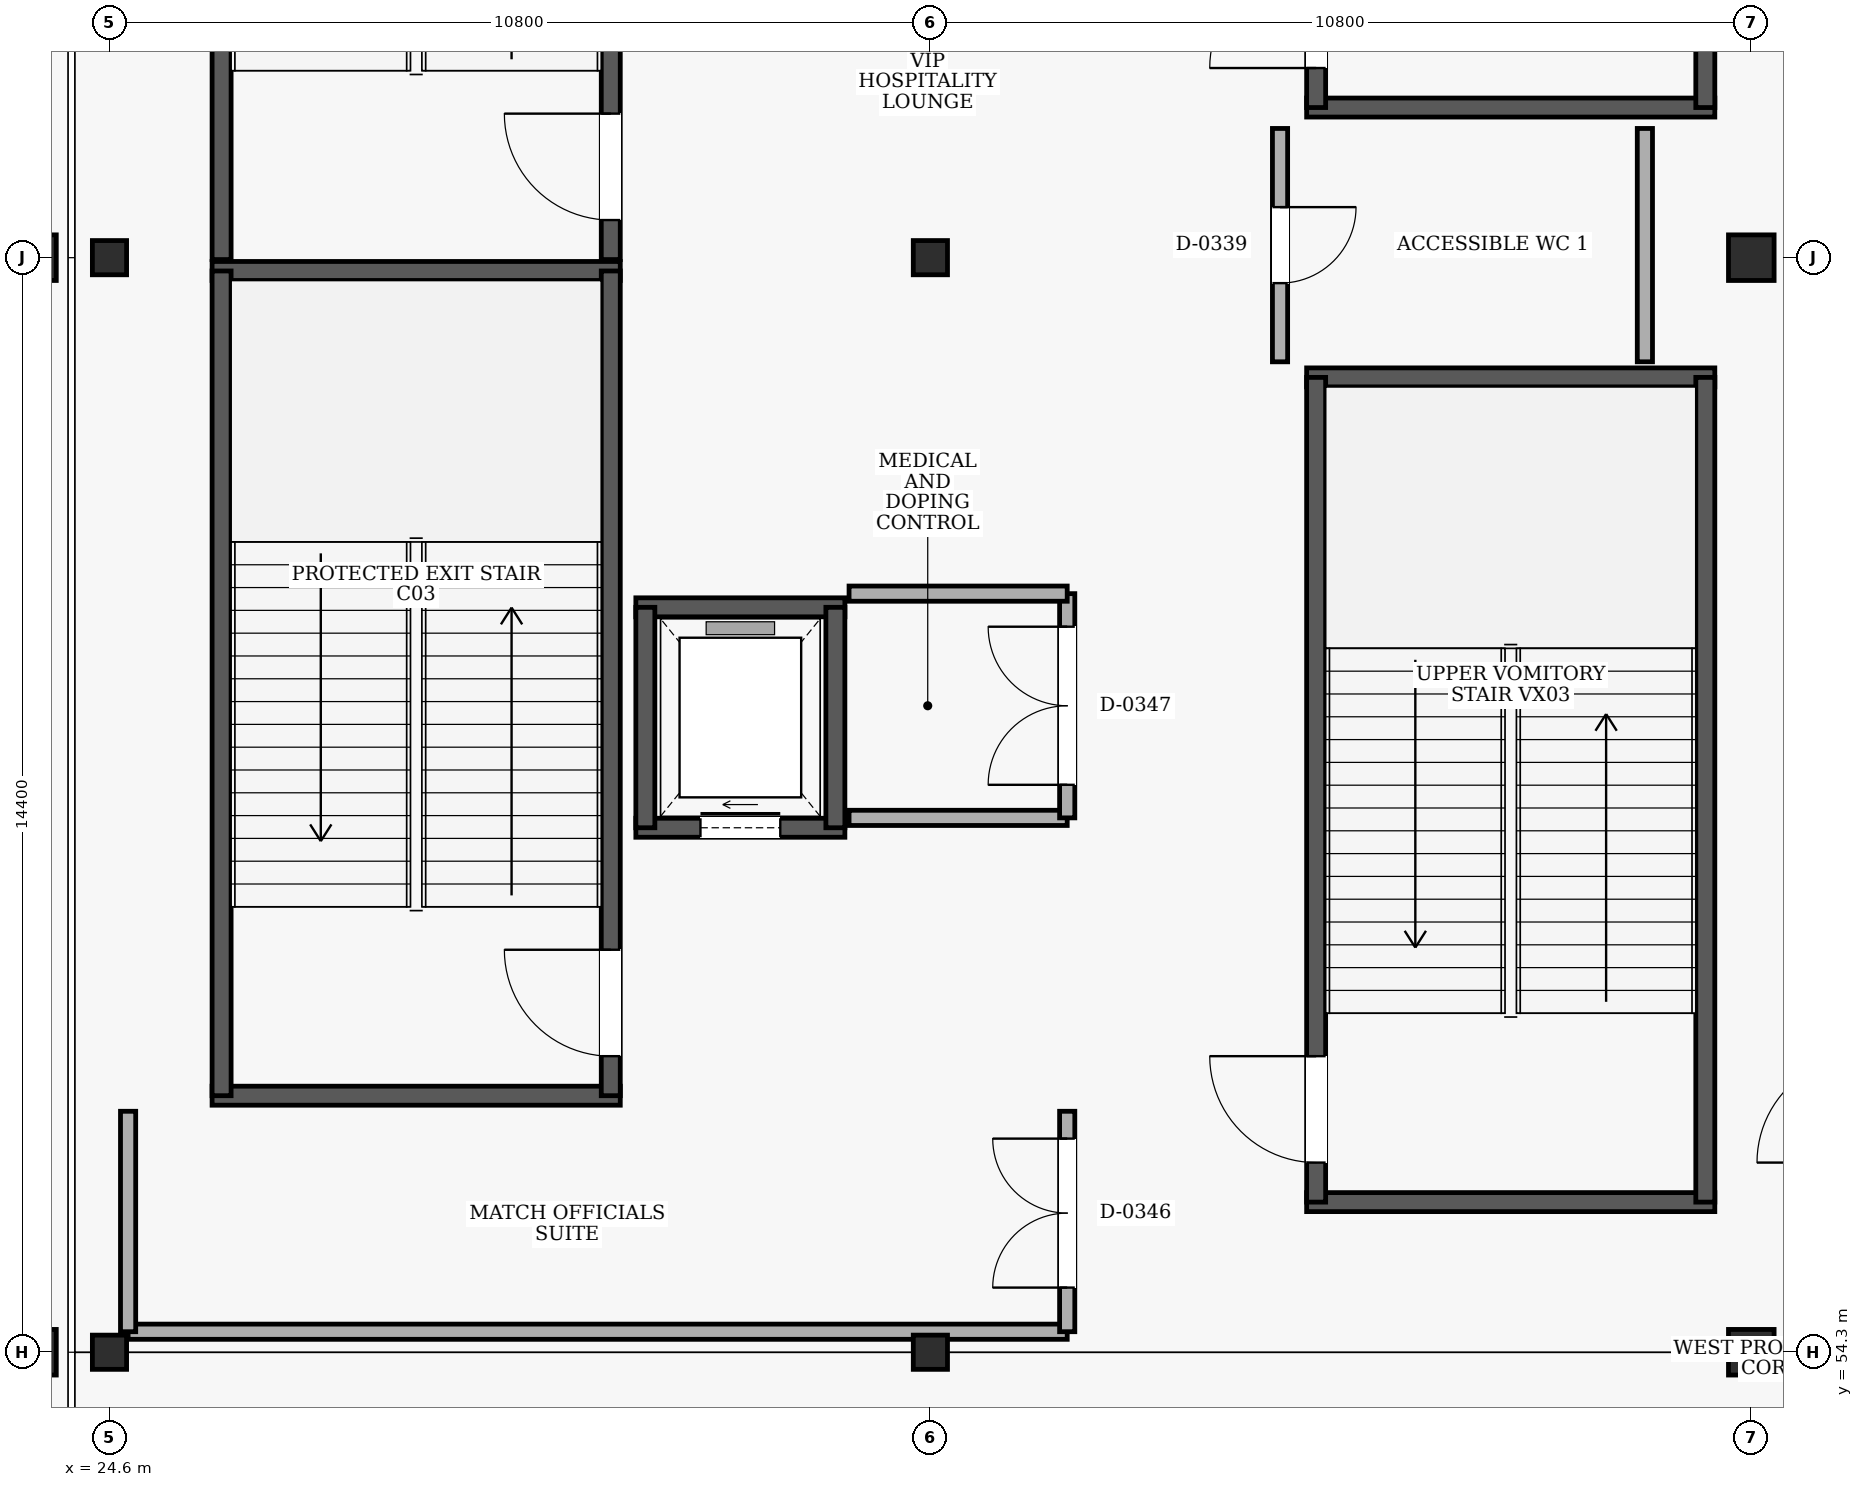
"""IFC4 building model, lengths in metres.
Left out: names, types, materials, properties, quantities, classifications, styles, units other than length and angle.
Written with IfcOpenShell. Run it as: python <this file> out.ifc"""

import sys

from ifc_helpers import new_model, si_unit, direction, frame, frame_2d, origin, origin_2d, place, context, subcontext, project, spatial, rectangle, extrude, element, fill, save


model = new_model("IFC4")
c1 = context("Model", 3, precision=1e-05, world=origin(), true_north=direction((0.0, 1.0)))
c2 = subcontext(c1, "Body", "Model", "MODEL_VIEW")
j1 = project(units=[si_unit("LENGTHUNIT", "METRE"), si_unit("PLANEANGLEUNIT", "RADIAN")], contexts=[c1])
p1 = place(None, origin())
s1 = spatial("IfcSite", under=j1, at=p1, CompositionType="ELEMENT")
p2 = place(p1, origin())
s2 = spatial("IfcBuilding", under=s1, at=p2, CompositionType="ELEMENT")
p3 = place(p2, origin())
s3 = spatial("IfcBuildingStorey", under=s2, at=p3, CompositionType="ELEMENT", Elevation=0.0)
for number, where, z_axis, x_axis in (
    (1, (23.6, 54.3, 0.0), (0.0, 0.0, 1.0), (1.0, 0.0, 0.0)),
    (2, (23.6, 68.7, 0.0), (0.0, 0.0, 1.0), (1.0, 0.0, 0.0)),
):
    element("IfcColumn", number, at=place(p3, frame(where, z_axis=z_axis, x_axis=x_axis)), inside=s3, PredefinedType="COLUMN", context=c2, shape_type="SweptSolid", body=[
        extrude(rectangle(XDim=0.6, YDim=0.6, at=origin_2d()), origin(), (0.0, 0.0, 1.0), 5.4),
    ])
for number, where, z_axis, x_axis in (
    (3, (24.6, 54.3, 0.0), (0.0, 0.0, 1.0), (1.0, 0.0, 0.0)),
    (4, (24.6, 68.7, 0.0), (0.0, 0.0, 1.0), (1.0, 0.0, 0.0)),
    (5, (35.4, 54.3, 0.0), (0.0, 0.0, 1.0), (1.0, 0.0, 0.0)),
    (6, (35.4, 68.7, 0.0), (0.0, 0.0, 1.0), (1.0, 0.0, 0.0)),
):
    element("IfcColumn", number, at=place(p3, frame(where, z_axis=z_axis, x_axis=x_axis)), inside=s3, PredefinedType="COLUMN", context=c2, shape_type="SweptSolid", body=[
        extrude(rectangle(XDim=0.45, YDim=0.45, at=origin_2d()), origin(), (0.0, 0.0, 1.0), 5.4),
    ])
for number, where, z_axis, x_axis in (
    (7, (46.2, 54.3, 0.0), (0.0, 0.0, 1.0), (1.0, 0.0, 0.0)),
    (8, (46.2, 68.7, 0.0), (0.0, 0.0, 1.0), (1.0, 0.0, 0.0)),
):
    element("IfcColumn", number, at=place(p3, frame(where, z_axis=z_axis, x_axis=x_axis)), inside=s3, PredefinedType="COLUMN", context=c2, shape_type="SweptSolid", body=[
        extrude(rectangle(XDim=0.6, YDim=0.6, at=origin_2d()), origin(), (0.0, 0.0, 1.0), 5.4),
    ])
for number, where, z_axis, x_axis in (
    (9, (25.95, 57.675, 0.0), (0.0, 0.0, 1.0), (1.0, 0.0, 0.0)),
    (10, (31.32, 68.525, 0.0), (0.0, 0.0, 1.0), (-1.0, 0.0, 0.0)),
):
    element("IfcWall", number, at=place(p3, frame(where, z_axis=z_axis, x_axis=x_axis)), inside=s3, PredefinedType="SHEAR", context=c2, shape_type="SweptSolid", body=[
        extrude(rectangle(XDim=5.37, YDim=0.25, at=frame_2d((2.685, 0.0))), origin(), (0.0, 0.0, 1.0), 5.08),
    ])
p4 = place(p3, frame((26.075, 57.675, 0.0), z_axis=(0.0, 0.0, 1.0), x_axis=(0.0, 1.0, 0.0)))
e11 = element("IfcWall", 11, at=p4, inside=s3, PredefinedType="SHEAR", context=c2, shape_type="SweptSolid", body=[
    extrude(rectangle(XDim=10.85, YDim=0.25, at=frame_2d((5.425, 0.0))), origin(), (0.0, 0.0, 1.0), 5.08),
])
p5 = place(p3, frame((31.195, 57.675, 0.0), z_axis=(0.0, 0.0, 1.0), x_axis=(0.0, 1.0, 0.0)))
e12 = element("IfcWall", 12, at=p5, inside=s3, PredefinedType="SHEAR", context=c2, shape_type="SweptSolid", body=[
    extrude(rectangle(XDim=10.85, YDim=0.25, at=frame_2d((5.425, 0.0))), origin(), (0.0, 0.0, 1.0), 5.08),
])
p6 = place(p5, frame((0.52, 0.0, 0.0)))
e13 = element("IfcOpeningElement", 13, at=p6, cuts=e12, PredefinedType="OPENING", context=c2, shape_type="SweptSolid", body=[
    extrude(rectangle(XDim=1.4, YDim=2.15, at=frame_2d((0.7, 1.075))), frame((0.0, 0.135, 0.0), z_axis=(0.0, -1.0, 0.0), x_axis=(1.0, 0.0, 0.0)), (0.0, 0.0, 1.0), 0.27),
])
p7 = place(p3, frame((26.075, 68.675, 0.0), z_axis=(0.0, 0.0, 1.0), x_axis=(0.0, 1.0, 0.0)))
e14 = element("IfcWall", 14, at=p7, inside=s3, PredefinedType="SHEAR", context=c2, shape_type="SweptSolid", body=[
    extrude(rectangle(XDim=10.85, YDim=0.25, at=frame_2d((5.425, 0.0))), origin(), (0.0, 0.0, 1.0), 5.08),
])
p8 = place(p3, frame((31.195, 68.675, 0.0), z_axis=(0.0, 0.0, 1.0), x_axis=(0.0, 1.0, 0.0)))
e15 = element("IfcWall", 15, at=p8, inside=s3, PredefinedType="SHEAR", context=c2, shape_type="SweptSolid", body=[
    extrude(rectangle(XDim=10.85, YDim=0.25, at=frame_2d((5.425, 0.0))), origin(), (0.0, 0.0, 1.0), 5.08),
])
p9 = place(p8, frame((0.52, 0.0, 0.0)))
e16 = element("IfcOpeningElement", 16, at=p9, cuts=e15, PredefinedType="OPENING", context=c2, shape_type="SweptSolid", body=[
    extrude(rectangle(XDim=1.4, YDim=2.15, at=frame_2d((0.7, 1.075))), frame((0.0, 0.135, 0.0), z_axis=(0.0, -1.0, 0.0), x_axis=(1.0, 0.0, 0.0)), (0.0, 0.0, 1.0), 0.27),
])
for number, where, z_axis, x_axis in (
    (17, (40.35, 56.275, 0.0), (0.0, 0.0, 1.0), (1.0, 0.0, 0.0)),
    (18, (45.72, 67.125, 0.0), (0.0, 0.0, 1.0), (-1.0, 0.0, 0.0)),
):
    element("IfcWall", number, at=place(p3, frame(where, z_axis=z_axis, x_axis=x_axis)), inside=s3, PredefinedType="SHEAR", context=c2, shape_type="SweptSolid", body=[
        extrude(rectangle(XDim=5.37, YDim=0.25, at=frame_2d((2.685, 0.0))), origin(), (0.0, 0.0, 1.0), 5.08),
    ])
p10 = place(p3, frame((40.475, 56.275, 0.0), z_axis=(0.0, 0.0, 1.0), x_axis=(0.0, 1.0, 0.0)))
e19 = element("IfcWall", 19, at=p10, inside=s3, PredefinedType="SHEAR", context=c2, shape_type="SweptSolid", body=[
    extrude(rectangle(XDim=10.85, YDim=0.25, at=frame_2d((5.425, 0.0))), origin(), (0.0, 0.0, 1.0), 5.08),
])
p11 = place(p10, frame((0.52, 0.0, 0.0)))
e20 = element("IfcOpeningElement", 20, at=p11, cuts=e19, PredefinedType="OPENING", context=c2, shape_type="SweptSolid", body=[
    extrude(rectangle(XDim=1.4, YDim=2.15, at=frame_2d((0.7, 1.075))), frame((0.0, 0.135, 0.0), z_axis=(0.0, -1.0, 0.0), x_axis=(1.0, 0.0, 0.0)), (0.0, 0.0, 1.0), 0.27),
])
p12 = place(p3, frame((45.595, 56.275, 0.0), z_axis=(0.0, 0.0, 1.0), x_axis=(0.0, 1.0, 0.0)))
e21 = element("IfcWall", 21, at=p12, inside=s3, PredefinedType="SHEAR", context=c2, shape_type="SweptSolid", body=[
    extrude(rectangle(XDim=10.85, YDim=0.25, at=frame_2d((5.425, 0.0))), origin(), (0.0, 0.0, 1.0), 5.08),
])
p13 = place(p3, frame((40.35, 70.675, 0.0), z_axis=(0.0, 0.0, 1.0), x_axis=(1.0, 0.0, 0.0)))
e22 = element("IfcWall", 22, at=p13, inside=s3, PredefinedType="SHEAR", context=c2, shape_type="SweptSolid", body=[
    extrude(rectangle(XDim=5.37, YDim=0.25, at=frame_2d((2.685, 0.0))), origin(), (0.0, 0.0, 1.0), 5.08),
])
p14 = place(p3, frame((40.475, 70.675, 0.0), z_axis=(0.0, 0.0, 1.0), x_axis=(0.0, 1.0, 0.0)))
e23 = element("IfcWall", 23, at=p14, inside=s3, PredefinedType="SHEAR", context=c2, shape_type="SweptSolid", body=[
    extrude(rectangle(XDim=10.85, YDim=0.25, at=frame_2d((5.425, 0.0))), origin(), (0.0, 0.0, 1.0), 5.08),
])
p15 = place(p14, frame((0.52, 0.0, 0.0)))
e24 = element("IfcOpeningElement", 24, at=p15, cuts=e23, PredefinedType="OPENING", context=c2, shape_type="SweptSolid", body=[
    extrude(rectangle(XDim=1.4, YDim=2.15, at=frame_2d((0.7, 1.075))), frame((0.0, 0.135, 0.0), z_axis=(0.0, -1.0, 0.0), x_axis=(1.0, 0.0, 0.0)), (0.0, 0.0, 1.0), 0.27),
])
p16 = place(p3, frame((45.595, 70.675, 0.0), z_axis=(0.0, 0.0, 1.0), x_axis=(0.0, 1.0, 0.0)))
e25 = element("IfcWall", 25, at=p16, inside=s3, PredefinedType="SHEAR", context=c2, shape_type="SweptSolid", body=[
    extrude(rectangle(XDim=10.85, YDim=0.25, at=frame_2d((5.425, 0.0))), origin(), (0.0, 0.0, 1.0), 5.08),
])
p17 = place(p3, frame((31.525, 61.2, 0.0), z_axis=(0.0, 0.0, 1.0), x_axis=(1.0, 0.0, 0.0)))
e26 = element("IfcWall", 26, at=p17, inside=s3, PredefinedType="SHEAR", context=c2, shape_type="SweptSolid", body=[
    extrude(rectangle(XDim=2.75, YDim=0.25, at=frame_2d((1.375, 0.0))), origin(), (0.0, 0.0, 1.0), 5.08),
])
p18 = place(p17, frame((0.85, 0.0, 0.0)))
e27 = element("IfcOpeningElement", 27, at=p18, cuts=e26, PredefinedType="OPENING", context=c2, shape_type="SweptSolid", body=[
    extrude(rectangle(XDim=1.05, YDim=2.15, at=frame_2d((0.525, 1.075))), frame((0.0, 0.135, 0.0), z_axis=(0.0, -1.0, 0.0), x_axis=(1.0, 0.0, 0.0)), (0.0, 0.0, 1.0), 0.27),
])
p19 = place(p3, frame((34.275, 64.1, 0.0), z_axis=(0.0, 0.0, 1.0), x_axis=(-1.0, 0.0, 0.0)))
e28 = element("IfcWall", 28, at=p19, inside=s3, PredefinedType="SHEAR", context=c2, shape_type="SweptSolid", body=[
    extrude(rectangle(XDim=2.75, YDim=0.25, at=frame_2d((1.375, 0.0))), origin(), (0.0, 0.0, 1.0), 5.08),
])
for number, where, z_axis, x_axis in (
    (29, (31.65, 64.1, 0.0), (0.0, 0.0, 1.0), (0.0, -1.0, 0.0)),
    (30, (34.15, 61.2, 0.0), (0.0, 0.0, 1.0), (0.0, 1.0, 0.0)),
):
    element("IfcWall", number, at=place(p3, frame(where, z_axis=z_axis, x_axis=x_axis)), inside=s3, PredefinedType="SHEAR", context=c2, shape_type="SweptSolid", body=[
        extrude(rectangle(XDim=2.9, YDim=0.25, at=frame_2d((1.45, 0.0))), origin(), (0.0, 0.0, 1.0), 5.08),
    ])
p20 = place(p3, frame((44.8, 67.33, 0.0), z_axis=(0.0, 0.0, 1.0), x_axis=(0.0, 1.0, 0.0)))
e31 = element("IfcWall", 31, at=p20, inside=s3, PredefinedType="PARTITIONING", context=c2, shape_type="SweptSolid", body=[
    extrude(rectangle(XDim=3.07, YDim=0.2, at=frame_2d((1.535, 0.0))), origin(), (0.0, 0.0, 1.0), 5.08),
])
p21 = place(p3, frame((40.0, 70.4, 0.0), z_axis=(0.0, 0.0, 1.0), x_axis=(0.0, -1.0, 0.0)))
e32 = element("IfcWall", 32, at=p21, inside=s3, PredefinedType="PARTITIONING", context=c2, shape_type="SweptSolid", body=[
    extrude(rectangle(XDim=3.07, YDim=0.2, at=frame_2d((1.535, 0.0))), origin(), (0.0, 0.0, 1.0), 5.08),
])
p22 = place(p21, frame((1.035, 0.0, 0.0)))
e33 = element("IfcOpeningElement", 33, at=p22, cuts=e32, PredefinedType="OPENING", context=c2, shape_type="SweptSolid", body=[
    extrude(rectangle(XDim=1.0, YDim=2.1, at=frame_2d((0.5, 1.05))), frame((0.0, 0.11, 0.0), z_axis=(0.0, -1.0, 0.0), x_axis=(1.0, 0.0, 0.0)), (0.0, 0.0, 1.0), 0.22),
])
p23 = place(p3, frame((24.845, 54.57, 0.0), z_axis=(0.0, 0.0, 1.0), x_axis=(1.0, 0.0, 0.0)))
e34 = element("IfcWall", 34, at=p23, inside=s3, PredefinedType="PARTITIONING", context=c2, shape_type="SweptSolid", body=[
    extrude(rectangle(XDim=12.355, YDim=0.2, at=frame_2d((6.177, 0.0))), origin(), (0.0, 0.0, 1.0), 4.26),
])
p24 = place(p3, frame((37.2, 54.57, 0.0), z_axis=(0.0, 0.0, 1.0), x_axis=(0.0, 1.0, 0.0)))
e35 = element("IfcWall", 35, at=p24, inside=s3, PredefinedType="PARTITIONING", context=c2, shape_type="SweptSolid", body=[
    extrude(rectangle(XDim=2.9, YDim=0.2, at=frame_2d((1.45, 0.0))), origin(), (0.0, 0.0, 1.0), 5.08),
])
p25 = place(p24, frame((0.58, 0.0, 0.0)))
e36 = element("IfcOpeningElement", 36, at=p25, cuts=e35, PredefinedType="OPENING", context=c2, shape_type="SweptSolid", body=[
    extrude(rectangle(XDim=1.96, YDim=2.3, at=frame_2d((0.98, 1.15))), frame((0.0, 0.11, 0.0), z_axis=(0.0, -1.0, 0.0), x_axis=(1.0, 0.0, 0.0)), (0.0, 0.0, 1.0), 0.22),
])
p26 = place(p3, frame((24.845, 57.47, 0.0), z_axis=(0.0, 0.0, 1.0), x_axis=(0.0, -1.0, 0.0)))
e37 = element("IfcWall", 37, at=p26, inside=s3, PredefinedType="PARTITIONING", context=c2, shape_type="SweptSolid", body=[
    extrude(rectangle(XDim=2.9, YDim=0.2, at=frame_2d((1.45, 0.0))), origin(), (0.0, 0.0, 1.0), 4.16),
])
p27 = place(p3, frame((34.33, 61.33, 0.0), z_axis=(0.0, 0.0, 1.0), x_axis=(1.0, 0.0, 0.0)))
e38 = element("IfcWall", 38, at=p27, inside=s3, PredefinedType="PARTITIONING", context=c2, shape_type="SweptSolid", body=[
    extrude(rectangle(XDim=2.87, YDim=0.2, at=frame_2d((1.435, 0.0))), origin(), (0.0, 0.0, 1.0), 5.08),
])
p28 = place(p3, frame((37.2, 61.33, 0.0), z_axis=(0.0, 0.0, 1.0), x_axis=(0.0, 1.0, 0.0)))
e39 = element("IfcWall", 39, at=p28, inside=s3, PredefinedType="PARTITIONING", context=c2, shape_type="SweptSolid", body=[
    extrude(rectangle(XDim=2.95, YDim=0.2, at=frame_2d((1.475, 0.0))), origin(), (0.0, 0.0, 1.0), 5.08),
])
p29 = place(p28, frame((0.435, 0.0, 0.0)))
e40 = element("IfcOpeningElement", 40, at=p29, cuts=e39, PredefinedType="OPENING", context=c2, shape_type="SweptSolid", body=[
    extrude(rectangle(XDim=2.08, YDim=2.35, at=frame_2d((1.04, 1.175))), frame((0.0, 0.11, 0.0), z_axis=(0.0, -1.0, 0.0), x_axis=(1.0, 0.0, 0.0)), (0.0, 0.0, 1.0), 0.22),
])
p30 = place(p3, frame((37.2, 64.28, 0.0), z_axis=(0.0, 0.0, 1.0), x_axis=(-1.0, 0.0, 0.0)))
e41 = element("IfcWall", 41, at=p30, inside=s3, PredefinedType="PARTITIONING", context=c2, shape_type="SweptSolid", body=[
    extrude(rectangle(XDim=2.87, YDim=0.2, at=frame_2d((1.435, 0.0))), origin(), (0.0, 0.0, 1.0), 5.08),
])
p31 = place(p6, frame((1.4, 0.0, 0.0), z_axis=(0.0, 0.0, 1.0), x_axis=(-1.0, 0.0, 0.0)))
e42 = element("IfcDoor", 42, at=p31, inside=s3, OperationType="SINGLE_SWING_LEFT", PredefinedType="DOOR", context=c2, shape_type="SweptSolid", body=[
    extrude(rectangle(XDim=1.4, YDim=2.15, at=frame_2d((0.7, 1.075))), frame((0.0, 0.025, 0.0), z_axis=(0.0, -1.0, 0.0), x_axis=(1.0, 0.0, 0.0)), (0.0, 0.0, 1.0), 0.05),
])
fill(e13, e42)
p32 = place(p9, frame((1.4, 0.0, 0.0), z_axis=(0.0, 0.0, 1.0), x_axis=(-1.0, 0.0, 0.0)))
e43 = element("IfcDoor", 43, at=p32, inside=s3, OperationType="SINGLE_SWING_LEFT", PredefinedType="DOOR", context=c2, shape_type="SweptSolid", body=[
    extrude(rectangle(XDim=1.4, YDim=2.15, at=frame_2d((0.7, 1.075))), frame((0.0, 0.025, 0.0), z_axis=(0.0, -1.0, 0.0), x_axis=(1.0, 0.0, 0.0)), (0.0, 0.0, 1.0), 0.05),
])
fill(e16, e43)
p33 = place(p11, origin())
e44 = element("IfcDoor", 44, at=p33, inside=s3, OperationType="SINGLE_SWING_RIGHT", PredefinedType="DOOR", context=c2, shape_type="SweptSolid", body=[
    extrude(rectangle(XDim=1.4, YDim=2.15, at=frame_2d((0.7, 1.075))), frame((0.0, 0.025, 0.0), z_axis=(0.0, -1.0, 0.0), x_axis=(1.0, 0.0, 0.0)), (0.0, 0.0, 1.0), 0.05),
])
fill(e20, e44)
p34 = place(p15, origin())
e45 = element("IfcDoor", 45, at=p34, inside=s3, OperationType="SINGLE_SWING_LEFT", PredefinedType="DOOR", context=c2, shape_type="SweptSolid", body=[
    extrude(rectangle(XDim=1.4, YDim=2.15, at=frame_2d((0.7, 1.075))), frame((0.0, 0.025, 0.0), z_axis=(0.0, -1.0, 0.0), x_axis=(1.0, 0.0, 0.0)), (0.0, 0.0, 1.0), 0.05),
])
fill(e24, e45)
p35 = place(p18, origin())
e46 = element("IfcDoor", 46, at=p35, inside=s3, OperationType="SLIDING_TO_RIGHT", PredefinedType="DOOR", context=c2, shape_type="SweptSolid", body=[
    extrude(rectangle(XDim=1.05, YDim=2.15, at=frame_2d((0.525, 1.075))), frame((0.0, 0.025, 0.0), z_axis=(0.0, -1.0, 0.0), x_axis=(1.0, 0.0, 0.0)), (0.0, 0.0, 1.0), 0.05),
])
fill(e27, e46)
p36 = place(p22, origin())
e47 = element("IfcDoor", 47, at=p36, inside=s3, OperationType="SINGLE_SWING_LEFT", PredefinedType="DOOR", context=c2, shape_type="SweptSolid", body=[
    extrude(rectangle(XDim=1.0, YDim=2.1, at=frame_2d((0.5, 1.05))), frame((0.0, 0.025, 0.0), z_axis=(0.0, -1.0, 0.0), x_axis=(1.0, 0.0, 0.0)), (0.0, 0.0, 1.0), 0.05),
])
fill(e33, e47)
p37 = place(p25, origin())
e48 = element("IfcDoor", 48, at=p37, inside=s3, OperationType="DOUBLE_DOOR_SINGLE_SWING", PredefinedType="DOOR", context=c2, shape_type="SweptSolid", body=[
    extrude(rectangle(XDim=1.96, YDim=2.3, at=frame_2d((0.98, 1.15))), frame((0.0, 0.025, 0.0), z_axis=(0.0, -1.0, 0.0), x_axis=(1.0, 0.0, 0.0)), (0.0, 0.0, 1.0), 0.05),
])
fill(e36, e48)
p38 = place(p29, origin())
e49 = element("IfcDoor", 49, at=p38, inside=s3, OperationType="DOUBLE_DOOR_SINGLE_SWING", PredefinedType="DOOR", context=c2, shape_type="SweptSolid", body=[
    extrude(rectangle(XDim=2.08, YDim=2.35, at=frame_2d((1.04, 1.175))), frame((0.0, 0.025, 0.0), z_axis=(0.0, -1.0, 0.0), x_axis=(1.0, 0.0, 0.0)), (0.0, 0.0, 1.0), 0.05),
])
fill(e40, e49)
save(model, sys.argv[1])
